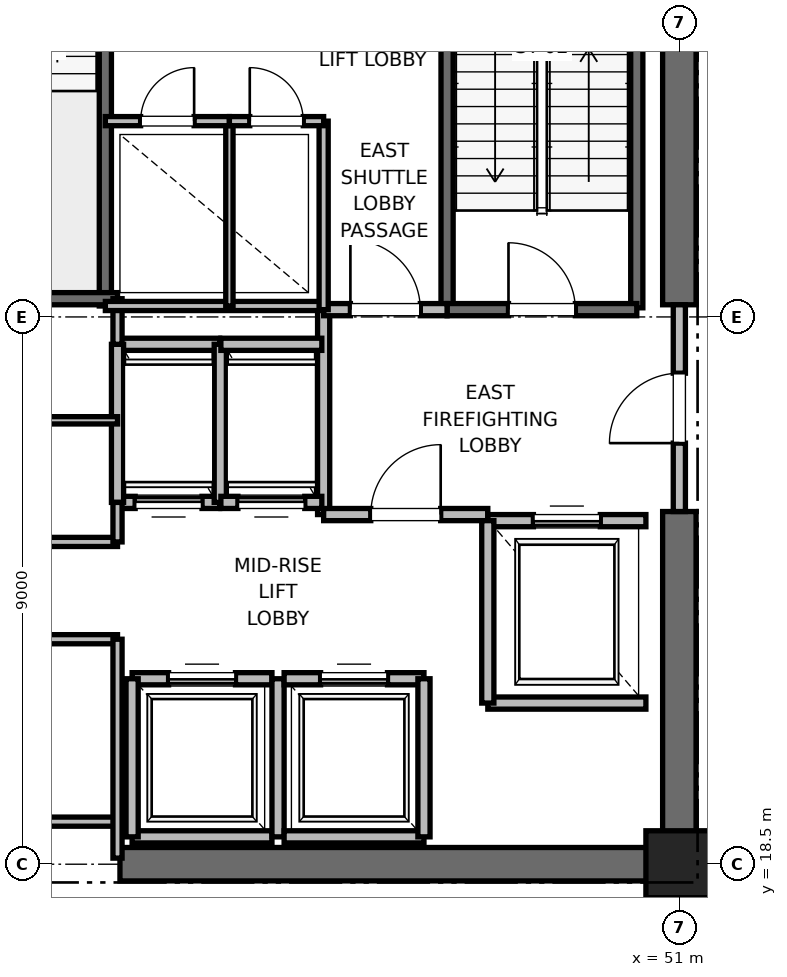
"""IFC4 building model, lengths in metres.
Left out: names, types, materials, properties, quantities, classifications, styles, units other than length and angle.
Written with IfcOpenShell. Run it as: python <this file> out.ifc"""

import sys

from ifc_helpers import new_model, si_unit, direction, frame, frame_2d, origin, origin_2d, place, context, subcontext, project, spatial, rectangle, extrude, element, fill, save


model = new_model("IFC4")
c1 = context("Model", 3, precision=1e-05, world=origin(), true_north=direction((0.0, 1.0)))
c2 = subcontext(c1, "Body", "Model", "MODEL_VIEW")
j1 = project(units=[si_unit("LENGTHUNIT", "METRE"), si_unit("PLANEANGLEUNIT", "RADIAN")], contexts=[c1])
p1 = place(None, origin())
s1 = spatial("IfcSite", under=j1, at=p1, CompositionType="ELEMENT")
p2 = place(p1, origin())
s2 = spatial("IfcBuilding", under=s1, at=p2, CompositionType="ELEMENT")
p3 = place(p2, frame((0.0, 0.0, 136.4)))
s3 = spatial("IfcBuildingStorey", under=s2, at=p3, CompositionType="ELEMENT", Elevation=136.4)
p4 = place(p3, frame((51.0, 18.5, 0.0), z_axis=(0.0, 0.0, 1.0), x_axis=(1.0, 0.0, 0.0)))
e1 = element("IfcColumn", 1, at=p4, inside=s3, PredefinedType="PILASTER", context=c2, shape_type="SweptSolid", body=[
    extrude(rectangle(XDim=1.1, YDim=1.1, at=origin_2d()), origin(), (0.0, 0.0, 1.0), 4.0),
])
p5 = place(p3, frame((41.8, 18.5, 0.0), z_axis=(0.0, 0.0, 1.0), x_axis=(1.0, 0.0, 0.0)))
e2 = element("IfcWall", 2, at=p5, inside=s3, PredefinedType="SHEAR", context=c2, shape_type="SweptSolid", body=[
    extrude(rectangle(XDim=9.2, YDim=0.55, at=frame_2d((4.6, 0.0))), origin(), (0.0, 0.0, 1.0), 3.775),
])
p6 = place(p3, frame((51.0, 18.5, 0.0), z_axis=(0.0, 0.0, 1.0), x_axis=(0.0, 1.0, 0.0)))
e3 = element("IfcWall", 3, at=p6, inside=s3, PredefinedType="SHEAR", context=c2, shape_type="SweptSolid", body=[
    extrude(rectangle(XDim=5.8, YDim=0.55, at=frame_2d((2.9, 0.0))), origin(), (0.0, 0.0, 1.0), 3.775),
])
p7 = place(p3, frame((51.0, 27.7, 0.0), z_axis=(0.0, 0.0, 1.0), x_axis=(0.0, 1.0, 0.0)))
e4 = element("IfcWall", 4, at=p7, inside=s3, PredefinedType="SHEAR", context=c2, shape_type="SweptSolid", body=[
    extrude(rectangle(XDim=8.8, YDim=0.55, at=frame_2d((4.4, 0.0))), origin(), (0.0, 0.0, 1.0), 3.775),
])
p8 = place(p3, frame((50.3, 27.65, 0.0), z_axis=(0.0, 0.0, 1.0), x_axis=(0.0, 1.0, 0.0)))
e5 = element("IfcWall", 5, at=p8, inside=s3, PredefinedType="SOLIDWALL", context=c2, shape_type="SweptSolid", body=[
    extrude(rectangle(XDim=8.15, YDim=0.2, at=frame_2d((4.075, 0.0))), origin(), (0.0, 0.0, 1.0), 3.775),
])
p9 = place(p3, frame((47.18, 27.62, 0.0), z_axis=(0.0, 0.0, 1.0), x_axis=(0.0, 1.0, 0.0)))
e6 = element("IfcWall", 6, at=p9, inside=s3, PredefinedType="SOLIDWALL", context=c2, shape_type="SweptSolid", body=[
    extrude(rectangle(XDim=8.18, YDim=0.2, at=frame_2d((4.09, 0.0))), origin(), (0.0, 0.0, 1.0), 3.775),
])
p10 = place(p3, frame((47.18, 27.62, 0.0), z_axis=(0.0, 0.0, 1.0), x_axis=(1.0, 0.0, 0.0)))
e7 = element("IfcWall", 7, at=p10, inside=s3, PredefinedType="SOLIDWALL", context=c2, shape_type="SweptSolid", body=[
    extrude(rectangle(XDim=3.12, YDim=0.2, at=frame_2d((1.56, 0.0))), origin(), (0.0, 0.0, 1.0), 3.775),
])
p11 = place(p10, frame((1.01, 0.0, 0.0)))
e8 = element("IfcOpeningElement", 8, at=p11, cuts=e7, PredefinedType="OPENING", context=c2, shape_type="SweptSolid", body=[
    extrude(rectangle(XDim=1.1, YDim=2.15, at=frame_2d((0.55, 1.075))), frame((0.0, 0.1, 0.0), z_axis=(0.0, -1.0, 0.0), x_axis=(1.0, 0.0, 0.0)), (0.0, 0.0, 1.0), 0.2),
])
p12 = place(p3, frame((41.56, 27.68, 0.0), z_axis=(0.0, 0.0, 1.0), x_axis=(0.0, 1.0, 0.0)))
e9 = element("IfcWall", 9, at=p12, inside=s3, PredefinedType="SOLIDWALL", context=c2, shape_type="SweptSolid", body=[
    extrude(rectangle(XDim=8.57, YDim=0.2, at=frame_2d((4.285, 0.0))), origin(), (0.0, 0.0, 1.0), 3.775),
])
p13 = place(p3, frame((38.44, 27.8, 0.0), z_axis=(0.0, 0.0, 1.0), x_axis=(1.0, 0.0, 0.0)))
e10 = element("IfcWall", 10, at=p13, inside=s3, PredefinedType="SOLIDWALL", context=c2, shape_type="SweptSolid", body=[
    extrude(rectangle(XDim=3.32, YDim=0.2, at=frame_2d((1.66, 0.0))), origin(), (0.0, 0.0, 1.0), 3.775),
])
p14 = place(p3, frame((45.15, 24.25, 0.0), z_axis=(0.0, 0.0, 1.0), x_axis=(0.0, 1.0, 0.0)))
e11 = element("IfcWall", 11, at=p14, inside=s3, PredefinedType="PARTITIONING", context=c2, shape_type="SweptSolid", body=[
    extrude(rectangle(XDim=3.37, YDim=0.2, at=frame_2d((1.685, 0.0))), origin(), (0.0, 0.0, 1.0), 3.775),
])
p15 = place(p3, frame((45.15, 24.25, 0.0), z_axis=(0.0, 0.0, 1.0), x_axis=(1.0, 0.0, 0.0)))
e12 = element("IfcWall", 12, at=p15, inside=s3, PredefinedType="PARTITIONING", context=c2, shape_type="SweptSolid", body=[
    extrude(rectangle(XDim=2.7, YDim=0.2, at=frame_2d((1.35, 0.0))), origin(), (0.0, 0.0, 1.0), 3.775),
])
p16 = place(p15, frame((0.775, 0.0, 0.0)))
e13 = element("IfcOpeningElement", 13, at=p16, cuts=e12, PredefinedType="OPENING", context=c2, shape_type="SweptSolid", body=[
    extrude(rectangle(XDim=1.15, YDim=2.2, at=frame_2d((0.575, 1.1))), frame((0.0, 0.1, 0.0), z_axis=(0.0, -1.0, 0.0), x_axis=(1.0, 0.0, 0.0)), (0.0, 0.0, 1.0), 0.2),
])
p17 = place(p3, frame((45.15, 27.62, 0.0), z_axis=(0.0, 0.0, 1.0), x_axis=(1.0, 0.0, 0.0)))
e14 = element("IfcWall", 14, at=p17, inside=s3, PredefinedType="PARTITIONING", context=c2, shape_type="SweptSolid", body=[
    extrude(rectangle(XDim=2.03, YDim=0.2, at=frame_2d((1.015, 0.0))), origin(), (0.0, 0.0, 1.0), 3.775),
])
p18 = place(p17, frame((0.44, 0.0, 0.0)))
e15 = element("IfcOpeningElement", 15, at=p18, cuts=e14, PredefinedType="OPENING", context=c2, shape_type="SweptSolid", body=[
    extrude(rectangle(XDim=1.15, YDim=2.2, at=frame_2d((0.575, 1.1))), frame((0.0, 0.1, 0.0), z_axis=(0.0, -1.0, 0.0), x_axis=(1.0, 0.0, 0.0)), (0.0, 0.0, 1.0), 0.2),
])
p19 = place(p3, frame((51.0, 24.3, 0.0), z_axis=(0.0, 0.0, 1.0), x_axis=(0.0, 1.0, 0.0)))
e16 = element("IfcWall", 16, at=p19, inside=s3, PredefinedType="PARTITIONING", context=c2, shape_type="SweptSolid", body=[
    extrude(rectangle(XDim=3.4, YDim=0.2, at=frame_2d((1.7, 0.0))), origin(), (0.0, 0.0, 1.0), 2.755),
])
p20 = place(p19, frame((1.125, 0.0, 0.0)))
e17 = element("IfcOpeningElement", 17, at=p20, cuts=e16, PredefinedType="OPENING", context=c2, shape_type="SweptSolid", body=[
    extrude(rectangle(XDim=1.15, YDim=2.2, at=frame_2d((0.575, 1.1))), frame((0.0, 0.1, 0.0), z_axis=(0.0, -1.0, 0.0), x_axis=(1.0, 0.0, 0.0)), (0.0, 0.0, 1.0), 0.2),
])
p21 = place(p3, frame((47.85, 21.15, 0.0), z_axis=(0.0, 0.0, 1.0), x_axis=(1.0, 0.0, 0.0)))
e18 = element("IfcWall", 18, at=p21, inside=s3, PredefinedType="SOLIDWALL", context=c2, shape_type="SweptSolid", body=[
    extrude(rectangle(XDim=2.6, YDim=0.2, at=frame_2d((1.3, 0.0))), origin(), (0.0, 0.0, 1.0), 3.775),
])
p22 = place(p3, frame((50.45, 24.15, 0.0), z_axis=(0.0, 0.0, 1.0), x_axis=(-1.0, 0.0, 0.0)))
e19 = element("IfcWall", 19, at=p22, inside=s3, PredefinedType="SOLIDWALL", context=c2, shape_type="SweptSolid", body=[
    extrude(rectangle(XDim=2.6, YDim=0.2, at=frame_2d((1.3, 0.0))), origin(), (0.0, 0.0, 1.0), 2.755),
])
p23 = place(p22, frame((0.75, 0.0, 0.0)))
e20 = element("IfcOpeningElement", 20, at=p23, cuts=e19, PredefinedType="OPENING", context=c2, shape_type="SweptSolid", body=[
    extrude(rectangle(XDim=1.1, YDim=2.2, at=frame_2d((0.55, 1.1))), frame((0.0, 0.1, 0.0), z_axis=(0.0, -1.0, 0.0), x_axis=(1.0, 0.0, 0.0)), (0.0, 0.0, 1.0), 0.2),
])
p24 = place(p3, frame((47.85, 24.15, 0.0), z_axis=(0.0, 0.0, 1.0), x_axis=(0.0, -1.0, 0.0)))
e21 = element("IfcWall", 21, at=p24, inside=s3, PredefinedType="SOLIDWALL", context=c2, shape_type="SweptSolid", body=[
    extrude(rectangle(XDim=3.0, YDim=0.2, at=frame_2d((1.5, 0.0))), origin(), (0.0, 0.0, 1.0), 3.775),
])
p25 = place(p3, frame((42.0, 18.95, 0.0), z_axis=(0.0, 0.0, 1.0), x_axis=(1.0, 0.0, 0.0)))
e22 = element("IfcWall", 22, at=p25, inside=s3, PredefinedType="SOLIDWALL", context=c2, shape_type="SweptSolid", body=[
    extrude(rectangle(XDim=2.3, YDim=0.2, at=frame_2d((1.15, 0.0))), origin(), (0.0, 0.0, 1.0), 2.755),
])
p26 = place(p3, frame((44.3, 21.55, 0.0), z_axis=(0.0, 0.0, 1.0), x_axis=(-1.0, 0.0, 0.0)))
e23 = element("IfcWall", 23, at=p26, inside=s3, PredefinedType="SOLIDWALL", context=c2, shape_type="SweptSolid", body=[
    extrude(rectangle(XDim=2.3, YDim=0.2, at=frame_2d((1.15, 0.0))), origin(), (0.0, 0.0, 1.0), 3.775),
])
p27 = place(p26, frame((0.6, 0.0, 0.0)))
e24 = element("IfcOpeningElement", 24, at=p27, cuts=e23, PredefinedType="OPENING", context=c2, shape_type="SweptSolid", body=[
    extrude(rectangle(XDim=1.1, YDim=2.2, at=frame_2d((0.55, 1.1))), frame((0.0, 0.1, 0.0), z_axis=(0.0, -1.0, 0.0), x_axis=(1.0, 0.0, 0.0)), (0.0, 0.0, 1.0), 0.2),
])
p28 = place(p3, frame((42.0, 21.55, 0.0), z_axis=(0.0, 0.0, 1.0), x_axis=(0.0, -1.0, 0.0)))
e25 = element("IfcWall", 25, at=p28, inside=s3, PredefinedType="SOLIDWALL", context=c2, shape_type="SweptSolid", body=[
    extrude(rectangle(XDim=2.6, YDim=0.2, at=frame_2d((1.3, 0.0))), origin(), (0.0, 0.0, 1.0), 2.755),
])
p29 = place(p3, frame((44.4, 18.95, 0.0), z_axis=(0.0, 0.0, 1.0), x_axis=(0.0, 1.0, 0.0)))
e26 = element("IfcWall", 26, at=p29, inside=s3, PredefinedType="SOLIDWALL", context=c2, shape_type="SweptSolid", body=[
    extrude(rectangle(XDim=2.6, YDim=0.2, at=frame_2d((1.3, 0.0))), origin(), (0.0, 0.0, 1.0), 3.775),
])
p30 = place(p3, frame((44.5, 18.95, 0.0), z_axis=(0.0, 0.0, 1.0), x_axis=(1.0, 0.0, 0.0)))
e27 = element("IfcWall", 27, at=p30, inside=s3, PredefinedType="SOLIDWALL", context=c2, shape_type="SweptSolid", body=[
    extrude(rectangle(XDim=2.3, YDim=0.2, at=frame_2d((1.15, 0.0))), origin(), (0.0, 0.0, 1.0), 3.775),
])
p31 = place(p3, frame((46.8, 21.55, 0.0), z_axis=(0.0, 0.0, 1.0), x_axis=(-1.0, 0.0, 0.0)))
e28 = element("IfcWall", 28, at=p31, inside=s3, PredefinedType="SOLIDWALL", context=c2, shape_type="SweptSolid", body=[
    extrude(rectangle(XDim=2.3, YDim=0.2, at=frame_2d((1.15, 0.0))), origin(), (0.0, 0.0, 1.0), 3.775),
])
p32 = place(p31, frame((0.6, 0.0, 0.0)))
e29 = element("IfcOpeningElement", 29, at=p32, cuts=e28, PredefinedType="OPENING", context=c2, shape_type="SweptSolid", body=[
    extrude(rectangle(XDim=1.1, YDim=2.2, at=frame_2d((0.55, 1.1))), frame((0.0, 0.1, 0.0), z_axis=(0.0, -1.0, 0.0), x_axis=(1.0, 0.0, 0.0)), (0.0, 0.0, 1.0), 0.2),
])
p33 = place(p3, frame((46.8, 18.95, 0.0), z_axis=(0.0, 0.0, 1.0), x_axis=(0.0, 1.0, 0.0)))
e30 = element("IfcWall", 30, at=p33, inside=s3, PredefinedType="SOLIDWALL", context=c2, shape_type="SweptSolid", body=[
    extrude(rectangle(XDim=2.6, YDim=0.2, at=frame_2d((1.3, 0.0))), origin(), (0.0, 0.0, 1.0), 3.775),
])
p34 = place(p3, frame((41.76, 24.45, 0.0), z_axis=(0.0, 0.0, 1.0), x_axis=(1.0, 0.0, 0.0)))
e31 = element("IfcWall", 31, at=p34, inside=s3, PredefinedType="SOLIDWALL", context=c2, shape_type="SweptSolid", body=[
    extrude(rectangle(XDim=1.68, YDim=0.2, at=frame_2d((0.84, 0.0))), origin(), (0.0, 0.0, 1.0), 3.775),
])
p35 = place(p34, frame((0.29, 0.0, 0.0)))
e32 = element("IfcOpeningElement", 32, at=p35, cuts=e31, PredefinedType="OPENING", context=c2, shape_type="SweptSolid", body=[
    extrude(rectangle(XDim=1.1, YDim=2.2, at=frame_2d((0.55, 1.1))), frame((0.0, 0.1, 0.0), z_axis=(0.0, -1.0, 0.0), x_axis=(1.0, 0.0, 0.0)), (0.0, 0.0, 1.0), 0.2),
])
p36 = place(p3, frame((43.44, 27.05, 0.0), z_axis=(0.0, 0.0, 1.0), x_axis=(-1.0, 0.0, 0.0)))
e33 = element("IfcWall", 33, at=p36, inside=s3, PredefinedType="SOLIDWALL", context=c2, shape_type="SweptSolid", body=[
    extrude(rectangle(XDim=1.68, YDim=0.2, at=frame_2d((0.84, 0.0))), origin(), (0.0, 0.0, 1.0), 3.775),
])
for number, where, z_axis, x_axis in (
    (34, (41.76, 27.05, 0.0), (0.0, 0.0, 1.0), (0.0, -1.0, 0.0)),
    (35, (43.45, 24.45, 0.0), (0.0, 0.0, 1.0), (0.0, 1.0, 0.0)),
):
    element("IfcWall", number, at=place(p3, frame(where, z_axis=z_axis, x_axis=x_axis)), inside=s3, PredefinedType="SOLIDWALL", context=c2, shape_type="SweptSolid", body=[
        extrude(rectangle(XDim=2.6, YDim=0.2, at=frame_2d((1.3, 0.0))), origin(), (0.0, 0.0, 1.0), 3.775),
    ])
p37 = place(p3, frame((43.46, 24.45, 0.0), z_axis=(0.0, 0.0, 1.0), x_axis=(1.0, 0.0, 0.0)))
e36 = element("IfcWall", 36, at=p37, inside=s3, PredefinedType="SOLIDWALL", context=c2, shape_type="SweptSolid", body=[
    extrude(rectangle(XDim=1.66, YDim=0.2, at=frame_2d((0.83, 0.0))), origin(), (0.0, 0.0, 1.0), 3.775),
])
p38 = place(p37, frame((0.28, 0.0, 0.0)))
e37 = element("IfcOpeningElement", 37, at=p38, cuts=e36, PredefinedType="OPENING", context=c2, shape_type="SweptSolid", body=[
    extrude(rectangle(XDim=1.1, YDim=2.2, at=frame_2d((0.55, 1.1))), frame((0.0, 0.1, 0.0), z_axis=(0.0, -1.0, 0.0), x_axis=(1.0, 0.0, 0.0)), (0.0, 0.0, 1.0), 0.2),
])
p39 = place(p3, frame((45.12, 27.05, 0.0), z_axis=(0.0, 0.0, 1.0), x_axis=(-1.0, 0.0, 0.0)))
e38 = element("IfcWall", 38, at=p39, inside=s3, PredefinedType="SOLIDWALL", context=c2, shape_type="SweptSolid", body=[
    extrude(rectangle(XDim=1.66, YDim=0.2, at=frame_2d((0.83, 0.0))), origin(), (0.0, 0.0, 1.0), 3.775),
])
for number, where, z_axis, x_axis in (
    (39, (39.95, 19.2, 0.0), (0.0, 0.0, 1.0), (1.0, 0.0, 0.0)),
    (40, (39.95, 22.2, 0.0), (0.0, 0.0, 1.0), (1.0, 0.0, 0.0)),
    (41, (39.95, 23.8, 0.0), (0.0, 0.0, 1.0), (1.0, 0.0, 0.0)),
):
    element("IfcWall", number, at=place(p3, frame(where, z_axis=z_axis, x_axis=x_axis)), inside=s3, PredefinedType="PARTITIONING", context=c2, shape_type="SweptSolid", body=[
        extrude(rectangle(XDim=1.81, YDim=0.15, at=frame_2d((0.905, 0.0))), origin(), (0.0, 0.0, 1.0), 2.85),
    ])
p40 = place(p3, frame((39.95, 25.8, 0.0), z_axis=(0.0, 0.0, 1.0), x_axis=(1.0, 0.0, 0.0)))
e42 = element("IfcWall", 42, at=p40, inside=s3, PredefinedType="PARTITIONING", context=c2, shape_type="SweptSolid", body=[
    extrude(rectangle(XDim=1.81, YDim=0.12, at=frame_2d((0.905, 0.0))), origin(), (0.0, 0.0, 1.0), 2.85),
])
p41 = place(p3, frame((41.76, 18.6, 0.0), z_axis=(0.0, 0.0, 1.0), x_axis=(0.0, 1.0, 0.0)))
e43 = element("IfcWall", 43, at=p41, inside=s3, PredefinedType="PARTITIONING", context=c2, shape_type="SweptSolid", body=[
    extrude(rectangle(XDim=3.6, YDim=0.15, at=frame_2d((1.8, 0.0))), origin(), (0.0, 0.0, 1.0), 2.755),
])
p42 = place(p3, frame((41.76, 23.8, 0.0), z_axis=(0.0, 0.0, 1.0), x_axis=(0.0, 1.0, 0.0)))
e44 = element("IfcWall", 44, at=p42, inside=s3, PredefinedType="PARTITIONING", context=c2, shape_type="SweptSolid", body=[
    extrude(rectangle(XDim=0.65, YDim=0.15, at=frame_2d((0.325, 0.0))), origin(), (0.0, 0.0, 1.0), 2.85),
])
p43 = place(p3, frame((41.76, 27.05, 0.0), z_axis=(0.0, 0.0, 1.0), x_axis=(0.0, 1.0, 0.0)))
e45 = element("IfcWall", 45, at=p43, inside=s3, PredefinedType="PARTITIONING", context=c2, shape_type="SweptSolid", body=[
    extrude(rectangle(XDim=0.75, YDim=0.15, at=frame_2d((0.375, 0.0))), origin(), (0.0, 0.0, 1.0), 2.85),
])
p44 = place(p3, frame((41.56, 27.68, 0.0), z_axis=(0.0, 0.0, 1.0), x_axis=(1.0, 0.0, 0.0)))
e46 = element("IfcWall", 46, at=p44, inside=s3, PredefinedType="PARTITIONING", context=c2, shape_type="SweptSolid", body=[
    extrude(rectangle(XDim=3.59, YDim=0.15, at=frame_2d((1.795, 0.0))), origin(), (0.0, 0.0, 1.0), 2.85),
])
p45 = place(p3, frame((45.15, 27.62, 0.0), z_axis=(0.0, 0.0, 1.0), x_axis=(0.0, 1.0, 0.0)))
e47 = element("IfcWall", 47, at=p45, inside=s3, PredefinedType="PARTITIONING", context=c2, shape_type="SweptSolid", body=[
    extrude(rectangle(XDim=3.1, YDim=0.15, at=frame_2d((1.55, 0.0))), origin(), (0.0, 0.0, 1.0), 2.85),
])
p46 = place(p3, frame((43.6, 27.68, 0.0), z_axis=(0.0, 0.0, 1.0), x_axis=(0.0, 1.0, 0.0)))
e48 = element("IfcWall", 48, at=p46, inside=s3, PredefinedType="PARTITIONING", context=c2, shape_type="SweptSolid", body=[
    extrude(rectangle(XDim=3.04, YDim=0.12, at=frame_2d((1.52, 0.0))), origin(), (0.0, 0.0, 1.0), 2.85),
])
p47 = place(p3, frame((41.56, 30.72, 0.0), z_axis=(0.0, 0.0, 1.0), x_axis=(1.0, 0.0, 0.0)))
e49 = element("IfcWall", 49, at=p47, inside=s3, PredefinedType="PARTITIONING", context=c2, shape_type="SweptSolid", body=[
    extrude(rectangle(XDim=2.04, YDim=0.15, at=frame_2d((1.02, 0.0))), origin(), (0.0, 0.0, 1.0), 2.85),
])
p48 = place(p47, frame((0.58, 0.0, 0.0)))
e50 = element("IfcOpeningElement", 50, at=p48, cuts=e49, PredefinedType="OPENING", context=c2, shape_type="SweptSolid", body=[
    extrude(rectangle(XDim=0.88, YDim=2.1, at=frame_2d((0.44, 1.05))), frame((0.0, 0.075, 0.0), z_axis=(0.0, -1.0, 0.0), x_axis=(1.0, 0.0, 0.0)), (0.0, 0.0, 1.0), 0.15),
])
p49 = place(p3, frame((43.6, 30.72, 0.0), z_axis=(0.0, 0.0, 1.0), x_axis=(1.0, 0.0, 0.0)))
e51 = element("IfcWall", 51, at=p49, inside=s3, PredefinedType="PARTITIONING", context=c2, shape_type="SweptSolid", body=[
    extrude(rectangle(XDim=1.55, YDim=0.15, at=frame_2d((0.775, 0.0))), origin(), (0.0, 0.0, 1.0), 2.85),
])
p50 = place(p49, frame((0.335, 0.0, 0.0)))
e52 = element("IfcOpeningElement", 52, at=p50, cuts=e51, PredefinedType="OPENING", context=c2, shape_type="SweptSolid", body=[
    extrude(rectangle(XDim=0.88, YDim=2.1, at=frame_2d((0.44, 1.05))), frame((0.0, 0.075, 0.0), z_axis=(0.0, -1.0, 0.0), x_axis=(1.0, 0.0, 0.0)), (0.0, 0.0, 1.0), 0.15),
])
p51 = place(p11, origin())
e53 = element("IfcDoor", 53, at=p51, inside=s3, OperationType="SINGLE_SWING_LEFT", PredefinedType="DOOR", context=c2, shape_type="SweptSolid", body=[
    extrude(rectangle(XDim=1.1, YDim=2.15, at=frame_2d((0.55, 1.075))), frame((0.0, 0.025, 0.0), z_axis=(0.0, -1.0, 0.0), x_axis=(1.0, 0.0, 0.0)), (0.0, 0.0, 1.0), 0.05),
])
fill(e8, e53)
p52 = place(p16, origin())
e54 = element("IfcDoor", 54, at=p52, inside=s3, OperationType="SINGLE_SWING_RIGHT", PredefinedType="DOOR", context=c2, shape_type="SweptSolid", body=[
    extrude(rectangle(XDim=1.15, YDim=2.2, at=frame_2d((0.575, 1.1))), frame((0.0, 0.025, 0.0), z_axis=(0.0, -1.0, 0.0), x_axis=(1.0, 0.0, 0.0)), (0.0, 0.0, 1.0), 0.05),
])
fill(e13, e54)
p53 = place(p18, origin())
e55 = element("IfcDoor", 55, at=p53, inside=s3, OperationType="SINGLE_SWING_LEFT", PredefinedType="DOOR", context=c2, shape_type="SweptSolid", body=[
    extrude(rectangle(XDim=1.15, YDim=2.2, at=frame_2d((0.575, 1.1))), frame((0.0, 0.025, 0.0), z_axis=(0.0, -1.0, 0.0), x_axis=(1.0, 0.0, 0.0)), (0.0, 0.0, 1.0), 0.05),
])
fill(e15, e55)
p54 = place(p20, origin())
e56 = element("IfcDoor", 56, at=p54, inside=s3, OperationType="SINGLE_SWING_LEFT", PredefinedType="DOOR", context=c2, shape_type="SweptSolid", body=[
    extrude(rectangle(XDim=1.15, YDim=2.2, at=frame_2d((0.575, 1.1))), frame((0.0, 0.025, 0.0), z_axis=(0.0, -1.0, 0.0), x_axis=(1.0, 0.0, 0.0)), (0.0, 0.0, 1.0), 0.05),
])
fill(e17, e56)
p55 = place(p23, origin())
e57 = element("IfcDoor", 57, at=p55, inside=s3, OperationType="SLIDING_TO_RIGHT", PredefinedType="DOOR", context=c2, shape_type="SweptSolid", body=[
    extrude(rectangle(XDim=1.1, YDim=2.2, at=frame_2d((0.55, 1.1))), frame((0.0, 0.025, 0.0), z_axis=(0.0, -1.0, 0.0), x_axis=(1.0, 0.0, 0.0)), (0.0, 0.0, 1.0), 0.05),
])
fill(e20, e57)
p56 = place(p27, origin())
e58 = element("IfcDoor", 58, at=p56, inside=s3, OperationType="SLIDING_TO_RIGHT", PredefinedType="DOOR", context=c2, shape_type="SweptSolid", body=[
    extrude(rectangle(XDim=1.1, YDim=2.2, at=frame_2d((0.55, 1.1))), frame((0.0, 0.025, 0.0), z_axis=(0.0, -1.0, 0.0), x_axis=(1.0, 0.0, 0.0)), (0.0, 0.0, 1.0), 0.05),
])
fill(e24, e58)
p57 = place(p32, origin())
e59 = element("IfcDoor", 59, at=p57, inside=s3, OperationType="SLIDING_TO_RIGHT", PredefinedType="DOOR", context=c2, shape_type="SweptSolid", body=[
    extrude(rectangle(XDim=1.1, YDim=2.2, at=frame_2d((0.55, 1.1))), frame((0.0, 0.025, 0.0), z_axis=(0.0, -1.0, 0.0), x_axis=(1.0, 0.0, 0.0)), (0.0, 0.0, 1.0), 0.05),
])
fill(e29, e59)
p58 = place(p35, origin())
e60 = element("IfcDoor", 60, at=p58, inside=s3, OperationType="SLIDING_TO_RIGHT", PredefinedType="DOOR", context=c2, shape_type="SweptSolid", body=[
    extrude(rectangle(XDim=1.1, YDim=2.2, at=frame_2d((0.55, 1.1))), frame((0.0, 0.025, 0.0), z_axis=(0.0, -1.0, 0.0), x_axis=(1.0, 0.0, 0.0)), (0.0, 0.0, 1.0), 0.05),
])
fill(e32, e60)
p59 = place(p38, origin())
e61 = element("IfcDoor", 61, at=p59, inside=s3, OperationType="SLIDING_TO_RIGHT", PredefinedType="DOOR", context=c2, shape_type="SweptSolid", body=[
    extrude(rectangle(XDim=1.1, YDim=2.2, at=frame_2d((0.55, 1.1))), frame((0.0, 0.025, 0.0), z_axis=(0.0, -1.0, 0.0), x_axis=(1.0, 0.0, 0.0)), (0.0, 0.0, 1.0), 0.05),
])
fill(e37, e61)
p60 = place(p48, origin())
e62 = element("IfcDoor", 62, at=p60, inside=s3, OperationType="SINGLE_SWING_RIGHT", PredefinedType="DOOR", context=c2, shape_type="SweptSolid", body=[
    extrude(rectangle(XDim=0.88, YDim=2.1, at=frame_2d((0.44, 1.05))), frame((0.0, 0.025, 0.0), z_axis=(0.0, -1.0, 0.0), x_axis=(1.0, 0.0, 0.0)), (0.0, 0.0, 1.0), 0.05),
])
fill(e50, e62)
p61 = place(p50, origin())
e63 = element("IfcDoor", 63, at=p61, inside=s3, OperationType="SINGLE_SWING_LEFT", PredefinedType="DOOR", context=c2, shape_type="SweptSolid", body=[
    extrude(rectangle(XDim=0.88, YDim=2.1, at=frame_2d((0.44, 1.05))), frame((0.0, 0.025, 0.0), z_axis=(0.0, -1.0, 0.0), x_axis=(1.0, 0.0, 0.0)), (0.0, 0.0, 1.0), 0.05),
])
fill(e52, e63)
save(model, sys.argv[1])
